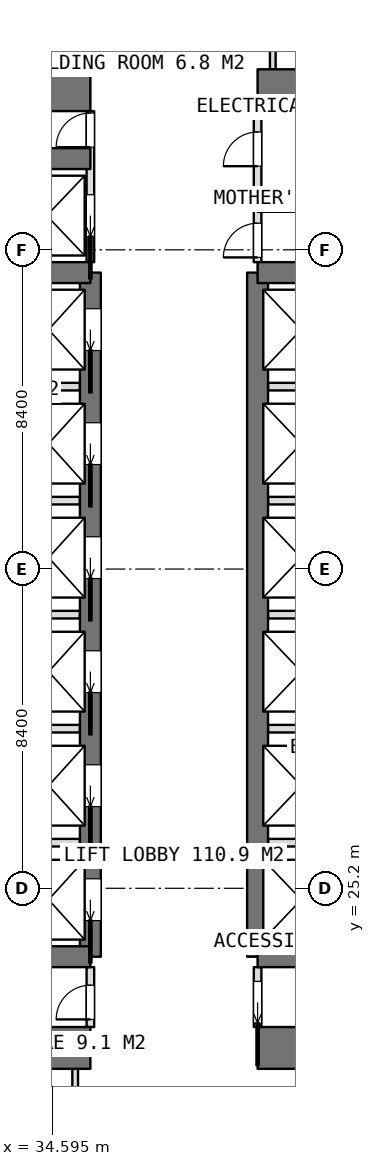
"""IFC4 building model, lengths in metres.
Left out: names, types, materials, properties, quantities, classifications, styles, units other than length and angle.
Written with IfcOpenShell. Run it as: python <this file> out.ifc"""

import sys

from ifc_helpers import new_model, si_unit, direction, frame, frame_2d, origin, place, context, subcontext, project, spatial, rectangle, extrude, element, fill, save


model = new_model("IFC4")
c1 = context("Model", 3, precision=1e-05, world=origin(), true_north=direction((0.0, 1.0)))
c2 = subcontext(c1, "Body", "Model", "MODEL_VIEW")
j1 = project(units=[si_unit("LENGTHUNIT", "METRE"), si_unit("PLANEANGLEUNIT", "RADIAN")], contexts=[c1])
p1 = place(None, origin())
s1 = spatial("IfcSite", under=j1, at=p1, CompositionType="ELEMENT")
p2 = place(p1, origin())
s2 = spatial("IfcBuilding", under=s1, at=p2, CompositionType="ELEMENT")
p3 = place(p2, frame((0.0, 0.0, 36.65)))
s3 = spatial("IfcBuildingStorey", under=s2, at=p3, CompositionType="ELEMENT", Elevation=36.65)
p4 = place(p3, frame((25.2, 21.0, 0.0), z_axis=(0.0, 0.0, 1.0), x_axis=(1.0, 0.0, 0.0)))
e1 = element("IfcWall", 1, at=p4, inside=s3, PredefinedType="SHEAR", context=c2, shape_type="SweptSolid", body=[
    extrude(rectangle(XDim=10.4, YDim=1.1, at=frame_2d((5.2, 0.0))), origin(), (0.0, 0.0, 1.0), 3.75),
])
p5 = place(p3, frame((40.0, 21.0, 0.0), z_axis=(0.0, 0.0, 1.0), x_axis=(1.0, 0.0, 0.0)))
e2 = element("IfcWall", 2, at=p5, inside=s3, PredefinedType="SHEAR", context=c2, shape_type="SweptSolid", body=[
    extrude(rectangle(XDim=10.4, YDim=1.1, at=frame_2d((5.2, 0.0))), origin(), (0.0, 0.0, 1.0), 3.75),
])
p6 = place(p3, frame((25.2, 46.2, 0.0), z_axis=(0.0, 0.0, 1.0), x_axis=(1.0, 0.0, 0.0)))
e3 = element("IfcWall", 3, at=p6, inside=s3, PredefinedType="SHEAR", context=c2, shape_type="SweptSolid", body=[
    extrude(rectangle(XDim=10.4, YDim=1.1, at=frame_2d((5.2, 0.0))), origin(), (0.0, 0.0, 1.0), 3.75),
])
p7 = place(p3, frame((40.0, 46.2, 0.0), z_axis=(0.0, 0.0, 1.0), x_axis=(1.0, 0.0, 0.0)))
e4 = element("IfcWall", 4, at=p7, inside=s3, PredefinedType="SHEAR", context=c2, shape_type="SweptSolid", body=[
    extrude(rectangle(XDim=10.4, YDim=1.1, at=frame_2d((5.2, 0.0))), origin(), (0.0, 0.0, 1.0), 3.75),
])
p8 = place(p3, frame((35.6, 23.4, 0.0), z_axis=(0.0, 0.0, 1.0), x_axis=(0.0, 1.0, 0.0)))
e5 = element("IfcWall", 5, at=p8, inside=s3, PredefinedType="SHEAR", context=c2, shape_type="SweptSolid", body=[
    extrude(rectangle(XDim=18.0, YDim=0.55, at=frame_2d((9.0, 0.0))), origin(), (0.0, 0.0, 1.0), 3.75),
])
p9 = place(p8, frame((0.95, 0.0, 0.0)))
e6 = element("IfcOpeningElement", 6, at=p9, cuts=e5, PredefinedType="OPENING", context=c2, shape_type="SweptSolid", body=[
    extrude(rectangle(XDim=1.1, YDim=2.1, at=frame_2d((0.55, 1.05))), frame((0.0, 0.285, 0.0), z_axis=(0.0, -1.0, 0.0), x_axis=(1.0, 0.0, 0.0)), (0.0, 0.0, 1.0), 0.57),
])
p10 = place(p8, frame((3.95, 0.0, 0.0)))
e7 = element("IfcOpeningElement", 7, at=p10, cuts=e5, PredefinedType="OPENING", context=c2, shape_type="SweptSolid", body=[
    extrude(rectangle(XDim=1.1, YDim=2.1, at=frame_2d((0.55, 1.05))), frame((0.0, 0.285, 0.0), z_axis=(0.0, -1.0, 0.0), x_axis=(1.0, 0.0, 0.0)), (0.0, 0.0, 1.0), 0.57),
])
p11 = place(p8, frame((6.95, 0.0, 0.0)))
e8 = element("IfcOpeningElement", 8, at=p11, cuts=e5, PredefinedType="OPENING", context=c2, shape_type="SweptSolid", body=[
    extrude(rectangle(XDim=1.1, YDim=2.1, at=frame_2d((0.55, 1.05))), frame((0.0, 0.285, 0.0), z_axis=(0.0, -1.0, 0.0), x_axis=(1.0, 0.0, 0.0)), (0.0, 0.0, 1.0), 0.57),
])
p12 = place(p8, frame((9.95, 0.0, 0.0)))
e9 = element("IfcOpeningElement", 9, at=p12, cuts=e5, PredefinedType="OPENING", context=c2, shape_type="SweptSolid", body=[
    extrude(rectangle(XDim=1.1, YDim=2.1, at=frame_2d((0.55, 1.05))), frame((0.0, 0.285, 0.0), z_axis=(0.0, -1.0, 0.0), x_axis=(1.0, 0.0, 0.0)), (0.0, 0.0, 1.0), 0.57),
])
p13 = place(p8, frame((12.95, 0.0, 0.0)))
e10 = element("IfcOpeningElement", 10, at=p13, cuts=e5, PredefinedType="OPENING", context=c2, shape_type="SweptSolid", body=[
    extrude(rectangle(XDim=1.1, YDim=2.1, at=frame_2d((0.55, 1.05))), frame((0.0, 0.285, 0.0), z_axis=(0.0, -1.0, 0.0), x_axis=(1.0, 0.0, 0.0)), (0.0, 0.0, 1.0), 0.57),
])
p14 = place(p8, frame((15.95, 0.0, 0.0)))
e11 = element("IfcOpeningElement", 11, at=p14, cuts=e5, PredefinedType="OPENING", context=c2, shape_type="SweptSolid", body=[
    extrude(rectangle(XDim=1.1, YDim=2.1, at=frame_2d((0.55, 1.05))), frame((0.0, 0.285, 0.0), z_axis=(0.0, -1.0, 0.0), x_axis=(1.0, 0.0, 0.0)), (0.0, 0.0, 1.0), 0.57),
])
p15 = place(p3, frame((40.0, 23.4, 0.0), z_axis=(0.0, 0.0, 1.0), x_axis=(0.0, 1.0, 0.0)))
e12 = element("IfcWall", 12, at=p15, inside=s3, PredefinedType="SHEAR", context=c2, shape_type="SweptSolid", body=[
    extrude(rectangle(XDim=18.0, YDim=0.55, at=frame_2d((9.0, 0.0))), origin(), (0.0, 0.0, 1.0), 3.75),
])
for number, where, z_axis, x_axis in (
    (13, (31.8, 23.4, 0.0), (0.0, 0.0, 1.0), (1.0, 0.0, 0.0)),
    (14, (31.8, 41.4, 0.0), (0.0, 0.0, 1.0), (1.0, 0.0, 0.0)),
    (15, (31.8, 44.4, 0.0), (0.0, 0.0, 1.0), (1.0, 0.0, 0.0)),
    (16, (40.0, 23.4, 0.0), (0.0, 0.0, 1.0), (1.0, 0.0, 0.0)),
    (17, (40.0, 41.4, 0.0), (0.0, 0.0, 1.0), (1.0, 0.0, 0.0)),
):
    element("IfcWall", number, at=place(p3, frame(where, z_axis=z_axis, x_axis=x_axis)), inside=s3, PredefinedType="SHEAR", context=c2, shape_type="SweptSolid", body=[
        extrude(rectangle(XDim=3.8, YDim=0.55, at=frame_2d((1.9, 0.0))), origin(), (0.0, 0.0, 1.0), 3.75),
    ])
for number, where, z_axis, x_axis in (
    (18, (32.075, 26.4, 0.0), (0.0, 0.0, 1.0), (1.0, 0.0, 0.0)),
    (19, (32.075, 29.4, 0.0), (0.0, 0.0, 1.0), (1.0, 0.0, 0.0)),
    (20, (32.075, 32.4, 0.0), (0.0, 0.0, 1.0), (1.0, 0.0, 0.0)),
    (21, (32.075, 35.4, 0.0), (0.0, 0.0, 1.0), (1.0, 0.0, 0.0)),
    (22, (32.075, 38.4, 0.0), (0.0, 0.0, 1.0), (1.0, 0.0, 0.0)),
    (23, (40.275, 26.4, 0.0), (0.0, 0.0, 1.0), (1.0, 0.0, 0.0)),
    (24, (40.275, 29.4, 0.0), (0.0, 0.0, 1.0), (1.0, 0.0, 0.0)),
    (25, (40.275, 32.4, 0.0), (0.0, 0.0, 1.0), (1.0, 0.0, 0.0)),
    (26, (40.275, 35.4, 0.0), (0.0, 0.0, 1.0), (1.0, 0.0, 0.0)),
    (27, (40.275, 38.4, 0.0), (0.0, 0.0, 1.0), (1.0, 0.0, 0.0)),
):
    element("IfcWall", number, at=place(p3, frame(where, z_axis=z_axis, x_axis=x_axis)), inside=s3, PredefinedType="PARTITIONING", context=c2, shape_type="SweptSolid", body=[
        extrude(rectangle(XDim=3.25, YDim=0.2, at=frame_2d((1.625, 0.0))), origin(), (0.0, 0.0, 1.0), 3.5),
    ])
p16 = place(p3, frame((40.0, 21.55, 0.0), z_axis=(0.0, 0.0, 1.0), x_axis=(0.0, 1.0, 0.0)))
e28 = element("IfcWall", 28, at=p16, inside=s3, PredefinedType="PARTITIONING", context=c2, shape_type="SweptSolid", body=[
    extrude(rectangle(XDim=1.575, YDim=0.2, at=frame_2d((0.788, 0.0))), origin(), (0.0, 0.0, 1.0), 3.5),
])
p17 = place(p16, frame((0.1, 0.0, 0.0)))
e29 = element("IfcOpeningElement", 29, at=p17, cuts=e28, PredefinedType="OPENING", context=c2, shape_type="SweptSolid", body=[
    extrude(rectangle(XDim=1.1, YDim=2.1, at=frame_2d((0.55, 1.05))), frame((0.0, 0.11, 0.0), z_axis=(0.0, -1.0, 0.0), x_axis=(1.0, 0.0, 0.0)), (0.0, 0.0, 1.0), 0.22),
])
p18 = place(p3, frame((40.0, 41.675, 0.0), z_axis=(0.0, 0.0, 1.0), x_axis=(0.0, 1.0, 0.0)))
e30 = element("IfcWall", 30, at=p18, inside=s3, PredefinedType="PARTITIONING", context=c2, shape_type="SweptSolid", body=[
    extrude(rectangle(XDim=3.975, YDim=0.2, at=frame_2d((1.987, 0.0))), origin(), (0.0, 0.0, 1.0), 3.5),
])
p19 = place(p18, frame((2.525, 0.0, 0.0)))
e31 = element("IfcOpeningElement", 31, at=p19, cuts=e30, PredefinedType="OPENING", context=c2, shape_type="SweptSolid", body=[
    extrude(rectangle(XDim=0.9, YDim=2.1, at=frame_2d((0.45, 1.05))), frame((0.0, 0.11, 0.0), z_axis=(0.0, -1.0, 0.0), x_axis=(1.0, 0.0, 0.0)), (0.0, 0.0, 1.0), 0.22),
])
p20 = place(p18, frame((0.125, 0.0, 0.0)))
e32 = element("IfcOpeningElement", 32, at=p20, cuts=e30, PredefinedType="OPENING", context=c2, shape_type="SweptSolid", body=[
    extrude(rectangle(XDim=0.9, YDim=2.1, at=frame_2d((0.45, 1.05))), frame((0.0, 0.11, 0.0), z_axis=(0.0, -1.0, 0.0), x_axis=(1.0, 0.0, 0.0)), (0.0, 0.0, 1.0), 0.22),
])
p21 = place(p3, frame((35.6, 41.675, 0.0), z_axis=(0.0, 0.0, 1.0), x_axis=(0.0, 1.0, 0.0)))
e33 = element("IfcWall", 33, at=p21, inside=s3, PredefinedType="PARTITIONING", context=c2, shape_type="SweptSolid", body=[
    extrude(rectangle(XDim=3.975, YDim=0.2, at=frame_2d((1.987, 0.0))), origin(), (0.0, 0.0, 1.0), 3.5),
])
p22 = place(p21, frame((3.025, 0.0, 0.0)))
e34 = element("IfcOpeningElement", 34, at=p22, cuts=e33, PredefinedType="OPENING", context=c2, shape_type="SweptSolid", body=[
    extrude(rectangle(XDim=0.9, YDim=2.1, at=frame_2d((0.45, 1.05))), frame((0.0, 0.11, 0.0), z_axis=(0.0, -1.0, 0.0), x_axis=(1.0, 0.0, 0.0)), (0.0, 0.0, 1.0), 0.22),
])
p23 = place(p21, frame((0.675, 0.0, 0.0)))
e35 = element("IfcOpeningElement", 35, at=p23, cuts=e33, PredefinedType="OPENING", context=c2, shape_type="SweptSolid", body=[
    extrude(rectangle(XDim=1.1, YDim=2.1, at=frame_2d((0.55, 1.05))), frame((0.0, 0.11, 0.0), z_axis=(0.0, -1.0, 0.0), x_axis=(1.0, 0.0, 0.0)), (0.0, 0.0, 1.0), 0.22),
])
p24 = place(p3, frame((35.6, 21.55, 0.0), z_axis=(0.0, 0.0, 1.0), x_axis=(0.0, 1.0, 0.0)))
e36 = element("IfcWall", 36, at=p24, inside=s3, PredefinedType="PARTITIONING", context=c2, shape_type="SweptSolid", body=[
    extrude(rectangle(XDim=1.575, YDim=0.2, at=frame_2d((0.788, 0.0))), origin(), (0.0, 0.0, 1.0), 3.5),
])
p25 = place(p24, frame((0.2, 0.0, 0.0)))
e37 = element("IfcOpeningElement", 37, at=p25, cuts=e36, PredefinedType="OPENING", context=c2, shape_type="SweptSolid", body=[
    extrude(rectangle(XDim=0.9, YDim=2.1, at=frame_2d((0.45, 1.05))), frame((0.0, 0.11, 0.0), z_axis=(0.0, -1.0, 0.0), x_axis=(1.0, 0.0, 0.0)), (0.0, 0.0, 1.0), 0.22),
])
p26 = place(p3, frame((40.0, 43.1, 0.0), z_axis=(0.0, 0.0, 1.0), x_axis=(1.0, 0.0, 0.0)))
e38 = element("IfcWall", 38, at=p26, inside=s3, PredefinedType="PARTITIONING", context=c2, shape_type="SweptSolid", body=[
    extrude(rectangle(XDim=3.525, YDim=0.2, at=frame_2d((1.762, 0.0))), origin(), (0.0, 0.0, 1.0), 3.5),
])
for number, where, z_axis, x_axis in (
    (39, (40.4, 46.75, 0.0), (0.0, 0.0, 1.0), (0.0, 1.0, 0.0)),
    (40, (35.2, 46.75, 0.0), (0.0, 0.0, 1.0), (0.0, 1.0, 0.0)),
    (41, (35.2, 17.875, 0.0), (0.0, 0.0, 1.0), (0.0, 1.0, 0.0)),
):
    element("IfcWall", number, at=place(p3, frame(where, z_axis=z_axis, x_axis=x_axis)), inside=s3, PredefinedType="PARTITIONING", context=c2, shape_type="SweptSolid", body=[
        extrude(rectangle(XDim=2.575, YDim=0.15, at=frame_2d((1.288, 0.0))), origin(), (0.0, 0.0, 1.0), 3.5),
    ])
p27 = place(p17, origin())
e42 = element("IfcDoor", 42, at=p27, inside=s3, OperationType="SLIDING_TO_LEFT", PredefinedType="DOOR", context=c2, shape_type="SweptSolid", body=[
    extrude(rectangle(XDim=1.1, YDim=2.1, at=frame_2d((0.55, 1.05))), frame((0.0, 0.025, 0.0), z_axis=(0.0, -1.0, 0.0), x_axis=(1.0, 0.0, 0.0)), (0.0, 0.0, 1.0), 0.05),
])
fill(e29, e42)
p28 = place(p25, origin())
e43 = element("IfcDoor", 43, at=p28, inside=s3, OperationType="SINGLE_SWING_LEFT", PredefinedType="DOOR", context=c2, shape_type="SweptSolid", body=[
    extrude(rectangle(XDim=0.9, YDim=2.1, at=frame_2d((0.45, 1.05))), frame((0.0, 0.025, 0.0), z_axis=(0.0, -1.0, 0.0), x_axis=(1.0, 0.0, 0.0)), (0.0, 0.0, 1.0), 0.05),
])
fill(e37, e43)
p29 = place(p19, origin())
e44 = element("IfcDoor", 44, at=p29, inside=s3, OperationType="SINGLE_SWING_LEFT", PredefinedType="DOOR", context=c2, shape_type="SweptSolid", body=[
    extrude(rectangle(XDim=0.9, YDim=2.1, at=frame_2d((0.45, 1.05))), frame((0.0, 0.025, 0.0), z_axis=(0.0, -1.0, 0.0), x_axis=(1.0, 0.0, 0.0)), (0.0, 0.0, 1.0), 0.05),
])
fill(e31, e44)
p30 = place(p20, origin())
e45 = element("IfcDoor", 45, at=p30, inside=s3, OperationType="SINGLE_SWING_LEFT", PredefinedType="DOOR", context=c2, shape_type="SweptSolid", body=[
    extrude(rectangle(XDim=0.9, YDim=2.1, at=frame_2d((0.45, 1.05))), frame((0.0, 0.025, 0.0), z_axis=(0.0, -1.0, 0.0), x_axis=(1.0, 0.0, 0.0)), (0.0, 0.0, 1.0), 0.05),
])
fill(e32, e45)
p31 = place(p22, origin())
e46 = element("IfcDoor", 46, at=p31, inside=s3, OperationType="SINGLE_SWING_LEFT", PredefinedType="DOOR", context=c2, shape_type="SweptSolid", body=[
    extrude(rectangle(XDim=0.9, YDim=2.1, at=frame_2d((0.45, 1.05))), frame((0.0, 0.025, 0.0), z_axis=(0.0, -1.0, 0.0), x_axis=(1.0, 0.0, 0.0)), (0.0, 0.0, 1.0), 0.05),
])
fill(e34, e46)
p32 = place(p9, origin())
e47 = element("IfcDoor", 47, at=p32, inside=s3, OperationType="SLIDING_TO_LEFT", PredefinedType="USERDEFINED", context=c2, shape_type="SweptSolid", body=[
    extrude(rectangle(XDim=1.1, YDim=2.1, at=frame_2d((0.55, 1.05))), frame((0.0, 0.025, 0.0), z_axis=(0.0, -1.0, 0.0), x_axis=(1.0, 0.0, 0.0)), (0.0, 0.0, 1.0), 0.05),
])
fill(e6, e47)
p33 = place(p10, origin())
e48 = element("IfcDoor", 48, at=p33, inside=s3, OperationType="SLIDING_TO_LEFT", PredefinedType="USERDEFINED", context=c2, shape_type="SweptSolid", body=[
    extrude(rectangle(XDim=1.1, YDim=2.1, at=frame_2d((0.55, 1.05))), frame((0.0, 0.025, 0.0), z_axis=(0.0, -1.0, 0.0), x_axis=(1.0, 0.0, 0.0)), (0.0, 0.0, 1.0), 0.05),
])
fill(e7, e48)
p34 = place(p11, origin())
e49 = element("IfcDoor", 49, at=p34, inside=s3, OperationType="SLIDING_TO_LEFT", PredefinedType="USERDEFINED", context=c2, shape_type="SweptSolid", body=[
    extrude(rectangle(XDim=1.1, YDim=2.1, at=frame_2d((0.55, 1.05))), frame((0.0, 0.025, 0.0), z_axis=(0.0, -1.0, 0.0), x_axis=(1.0, 0.0, 0.0)), (0.0, 0.0, 1.0), 0.05),
])
fill(e8, e49)
p35 = place(p12, origin())
e50 = element("IfcDoor", 50, at=p35, inside=s3, OperationType="SLIDING_TO_LEFT", PredefinedType="USERDEFINED", context=c2, shape_type="SweptSolid", body=[
    extrude(rectangle(XDim=1.1, YDim=2.1, at=frame_2d((0.55, 1.05))), frame((0.0, 0.025, 0.0), z_axis=(0.0, -1.0, 0.0), x_axis=(1.0, 0.0, 0.0)), (0.0, 0.0, 1.0), 0.05),
])
fill(e9, e50)
p36 = place(p13, origin())
e51 = element("IfcDoor", 51, at=p36, inside=s3, OperationType="SLIDING_TO_LEFT", PredefinedType="USERDEFINED", context=c2, shape_type="SweptSolid", body=[
    extrude(rectangle(XDim=1.1, YDim=2.1, at=frame_2d((0.55, 1.05))), frame((0.0, 0.025, 0.0), z_axis=(0.0, -1.0, 0.0), x_axis=(1.0, 0.0, 0.0)), (0.0, 0.0, 1.0), 0.05),
])
fill(e10, e51)
p37 = place(p14, origin())
e52 = element("IfcDoor", 52, at=p37, inside=s3, OperationType="SLIDING_TO_LEFT", PredefinedType="USERDEFINED", context=c2, shape_type="SweptSolid", body=[
    extrude(rectangle(XDim=1.1, YDim=2.1, at=frame_2d((0.55, 1.05))), frame((0.0, 0.025, 0.0), z_axis=(0.0, -1.0, 0.0), x_axis=(1.0, 0.0, 0.0)), (0.0, 0.0, 1.0), 0.05),
])
fill(e11, e52)
p38 = place(p23, origin())
e53 = element("IfcDoor", 53, at=p38, inside=s3, OperationType="SLIDING_TO_LEFT", PredefinedType="USERDEFINED", context=c2, shape_type="SweptSolid", body=[
    extrude(rectangle(XDim=1.1, YDim=2.1, at=frame_2d((0.55, 1.05))), frame((0.0, 0.025, 0.0), z_axis=(0.0, -1.0, 0.0), x_axis=(1.0, 0.0, 0.0)), (0.0, 0.0, 1.0), 0.05),
])
fill(e35, e53)
save(model, sys.argv[1])
